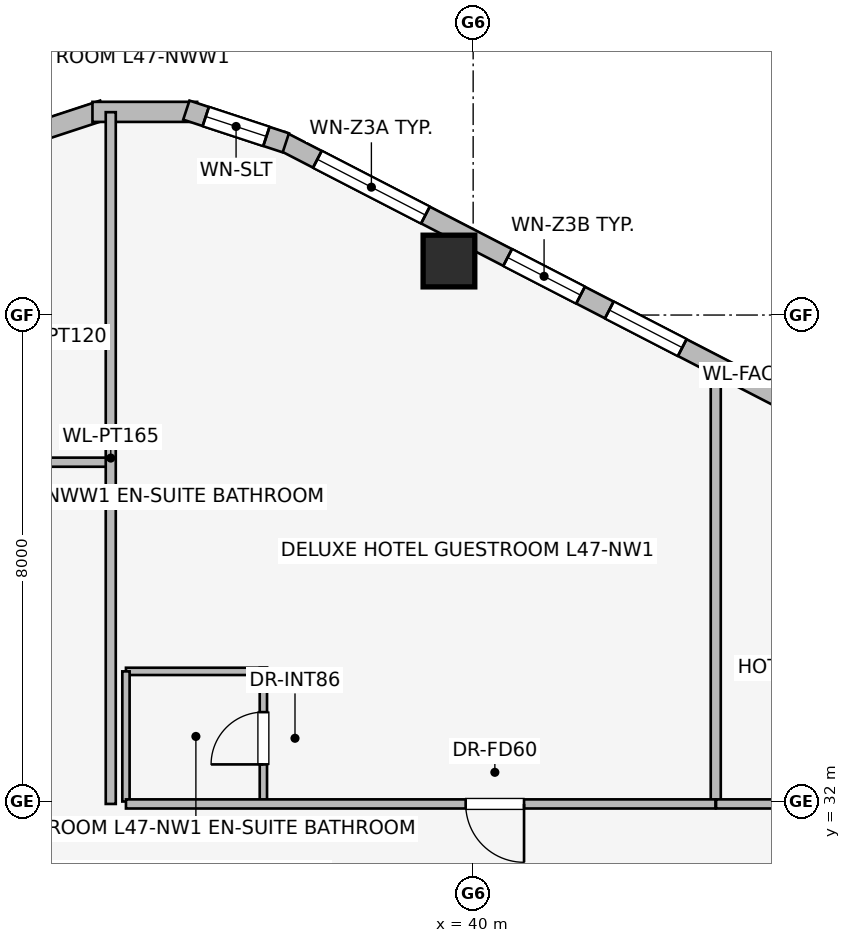
"""IFC4 building model, lengths in metres.
Left out: names, types, materials, properties, quantities, classifications, styles, units other than length and angle.
Written with IfcOpenShell. Run it as: python <this file> out.ifc"""

import sys

from ifc_helpers import new_model, si_unit, direction, frame, frame_2d, origin, origin_2d, place, context, subcontext, project, spatial, rectangle, extrude, element, fill, save


model = new_model("IFC4")
c1 = context("Model", 3, precision=1e-05, world=origin(), true_north=direction((0.0, 1.0)))
c2 = subcontext(c1, "Body", "Model", "MODEL_VIEW")
j1 = project(units=[si_unit("LENGTHUNIT", "METRE"), si_unit("PLANEANGLEUNIT", "RADIAN")], contexts=[c1])
p1 = place(None, origin())
s1 = spatial("IfcSite", under=j1, at=p1, CompositionType="ELEMENT")
p2 = place(p1, origin())
s2 = spatial("IfcBuilding", under=s1, at=p2, CompositionType="ELEMENT")
p3 = place(p2, frame((0.0, 0.0, 174.0)))
s3 = spatial("IfcBuildingStorey", under=s2, at=p3, CompositionType="ELEMENT", Elevation=174.0)
p4 = place(p3, frame((39.602, 40.888, 0.0), z_axis=(0.0, 0.0, 1.0), x_axis=(1.0, 0.0, 0.0)))
e1 = element("IfcColumn", 1, at=p4, inside=s3, PredefinedType="COLUMN", context=c2, shape_type="SweptSolid", body=[
    extrude(rectangle(XDim=0.85, YDim=0.85, at=origin_2d()), origin(), (0.0, 0.0, 1.0), 3.45),
])
p5 = place(p3, frame((36.838, 42.871, 0.0), z_axis=(0.0, 0.0, 1.0), x_axis=(0.888626188278, -0.458632202867, 0.0)))
e2 = element("IfcWall", 2, at=p5, inside=s3, PredefinedType="STANDARD", context=c2, shape_type="SweptSolid", body=[
    extrude(rectangle(XDim=16.828, YDim=0.31, at=frame_2d((8.414, 0.0))), origin(), (0.0, 0.0, 1.0), 3.16),
])
p6 = place(p5, frame((0.675, 0.0, 0.75)))
e3 = element("IfcOpeningElement", 3, at=p6, cuts=e2, PredefinedType="OPENING", context=c2, shape_type="SweptSolid", body=[
    extrude(rectangle(XDim=2.0, YDim=1.5, at=frame_2d((1.0, 0.75))), frame((0.0, 0.165, 0.0), z_axis=(0.0, -1.0, 0.0), x_axis=(1.0, 0.0, 0.0)), (0.0, 0.0, 1.0), 0.33),
])
p7 = place(p5, frame((4.196, 0.0, 0.75)))
e4 = element("IfcOpeningElement", 4, at=p7, cuts=e2, PredefinedType="OPENING", context=c2, shape_type="SweptSolid", body=[
    extrude(rectangle(XDim=1.35, YDim=1.45, at=frame_2d((0.675, 0.725))), frame((0.0, 0.165, 0.0), z_axis=(0.0, -1.0, 0.0), x_axis=(1.0, 0.0, 0.0)), (0.0, 0.0, 1.0), 0.33),
])
p8 = place(p5, frame((6.078, 0.0, 0.75)))
e5 = element("IfcOpeningElement", 5, at=p8, cuts=e2, PredefinedType="OPENING", context=c2, shape_type="SweptSolid", body=[
    extrude(rectangle(XDim=1.35, YDim=1.45, at=frame_2d((0.675, 0.725))), frame((0.0, 0.165, 0.0), z_axis=(0.0, -1.0, 0.0), x_axis=(1.0, 0.0, 0.0)), (0.0, 0.0, 1.0), 0.33),
])
p9 = place(p5, frame((9.658, 0.0, 0.75)))
e6 = element("IfcOpeningElement", 6, at=p9, cuts=e2, PredefinedType="OPENING", context=c2, shape_type="SweptSolid", body=[
    extrude(rectangle(XDim=2.0, YDim=1.5, at=frame_2d((1.0, 0.75))), frame((0.0, 0.165, 0.0), z_axis=(0.0, -1.0, 0.0), x_axis=(1.0, 0.0, 0.0)), (0.0, 0.0, 1.0), 0.33),
])
p10 = place(p5, frame((14.478, 0.0, 0.75)))
e7 = element("IfcOpeningElement", 7, at=p10, cuts=e2, PredefinedType="OPENING", context=c2, shape_type="SweptSolid", body=[
    extrude(rectangle(XDim=1.35, YDim=1.45, at=frame_2d((0.675, 0.725))), frame((0.0, 0.165, 0.0), z_axis=(0.0, -1.0, 0.0), x_axis=(1.0, 0.0, 0.0)), (0.0, 0.0, 1.0), 0.33),
])
p11 = place(p3, frame((32.281, 42.832, 0.0), z_axis=(0.0, 0.0, 1.0), x_axis=(0.949937416267, 0.312440242569, 0.0)))
e8 = element("IfcWall", 8, at=p11, inside=s3, PredefinedType="STANDARD", context=c2, shape_type="SweptSolid", body=[
    extrude(rectangle(XDim=1.722, YDim=0.33, at=frame_2d((0.861, 0.0))), origin(), (0.0, 0.0, 1.0), 3.16),
])
p12 = place(p3, frame((33.739, 43.341, 0.0), z_axis=(0.0, 0.0, 1.0), x_axis=(1.0, 0.0, 0.0)))
e9 = element("IfcWall", 9, at=p12, inside=s3, PredefinedType="STANDARD", context=c2, shape_type="SweptSolid", body=[
    extrude(rectangle(XDim=1.722, YDim=0.33, at=frame_2d((0.861, 0.0))), origin(), (0.0, 0.0, 1.0), 3.16),
])
p13 = place(p3, frame((35.283, 43.37, 0.0), z_axis=(0.0, 0.0, 1.0), x_axis=(0.949937416267, -0.312440242569, 0.0)))
e10 = element("IfcWall", 10, at=p13, inside=s3, PredefinedType="STANDARD", context=c2, shape_type="SweptSolid", body=[
    extrude(rectangle(XDim=1.722, YDim=0.33, at=frame_2d((0.861, 0.0))), origin(), (0.0, 0.0, 1.0), 3.16),
])
p14 = place(p13, frame((0.336, 0.0, 0.75)))
e11 = element("IfcOpeningElement", 11, at=p14, cuts=e10, PredefinedType="OPENING", context=c2, shape_type="SweptSolid", body=[
    extrude(rectangle(XDim=1.05, YDim=1.4, at=frame_2d((0.525, 0.7))), frame((0.0, 0.175, 0.0), z_axis=(0.0, -1.0, 0.0), x_axis=(1.0, 0.0, 0.0)), (0.0, 0.0, 1.0), 0.35),
])
p15 = place(p3, frame((34.0, 39.64, 0.0), z_axis=(0.0, 0.0, 1.0), x_axis=(-1.0, 0.0, 0.0)))
e12 = element("IfcWall", 12, at=p15, inside=s3, PredefinedType="PARTITIONING", context=c2, shape_type="SweptSolid", body=[
    extrude(rectangle(XDim=2.34, YDim=0.12, at=frame_2d((1.17, 0.0))), origin(), (0.0, 0.0, 1.0), 3.16),
])
p16 = place(p3, frame((34.0, 37.58, 0.0), z_axis=(0.0, 0.0, 1.0), x_axis=(-1.0, 0.0, 0.0)))
e13 = element("IfcWall", 13, at=p16, inside=s3, PredefinedType="PARTITIONING", context=c2, shape_type="SweptSolid", body=[
    extrude(rectangle(XDim=12.075, YDim=0.15, at=frame_2d((6.038, 0.0))), origin(), (0.0, 0.0, 1.0), 3.16),
])
p17 = place(p16, frame((4.96, 0.0, 0.0)))
e14 = element("IfcOpeningElement", 14, at=p17, cuts=e13, PredefinedType="OPENING", context=c2, shape_type="SweptSolid", body=[
    extrude(rectangle(XDim=0.96, YDim=2.0, at=frame_2d((0.48, 1.0))), frame((0.0, 0.085, 0.0), z_axis=(0.0, -1.0, 0.0), x_axis=(1.0, 0.0, 0.0)), (0.0, 0.0, 1.0), 0.17),
])
p18 = place(p3, frame((34.04, 31.96, 0.0), z_axis=(0.0, 0.0, 1.0), x_axis=(0.0, 1.0, 0.0)))
e15 = element("IfcWall", 15, at=p18, inside=s3, PredefinedType="PARTITIONING", context=c2, shape_type="SweptSolid", body=[
    extrude(rectangle(XDim=11.376, YDim=0.165, at=frame_2d((5.688, 0.0))), origin(), (0.0, 0.0, 1.0), 3.16),
])
p19 = place(p3, frame((43.99, 31.97, 0.0), z_axis=(0.0, 0.0, 1.0), x_axis=(0.0, 1.0, 0.0)))
e16 = element("IfcWall", 16, at=p19, inside=s3, PredefinedType="PARTITIONING", context=c2, shape_type="SweptSolid", body=[
    extrude(rectangle(XDim=7.193, YDim=0.165, at=frame_2d((3.597, 0.0))), origin(), (0.0, 0.0, 1.0), 3.16),
])
p20 = place(p3, frame((36.55, 31.96, 0.0), z_axis=(0.0, 0.0, 1.0), x_axis=(0.0, 1.0, 0.0)))
e17 = element("IfcWall", 17, at=p20, inside=s3, PredefinedType="PARTITIONING", context=c2, shape_type="SweptSolid", body=[
    extrude(rectangle(XDim=2.24, YDim=0.12, at=frame_2d((1.12, 0.0))), origin(), (0.0, 0.0, 1.0), 3.16),
])
p21 = place(p20, frame((0.65, 0.0, 0.0)))
e18 = element("IfcOpeningElement", 18, at=p21, cuts=e17, PredefinedType="OPENING", context=c2, shape_type="SweptSolid", body=[
    extrude(rectangle(XDim=0.86, YDim=2.0, at=frame_2d((0.43, 1.0))), frame((0.0, 0.07, 0.0), z_axis=(0.0, -1.0, 0.0), x_axis=(1.0, 0.0, 0.0)), (0.0, 0.0, 1.0), 0.14),
])
p22 = place(p3, frame((36.61, 34.14, 0.0), z_axis=(0.0, 0.0, 1.0), x_axis=(-1.0, 0.0, 0.0)))
e19 = element("IfcWall", 19, at=p22, inside=s3, PredefinedType="PARTITIONING", context=c2, shape_type="SweptSolid", body=[
    extrude(rectangle(XDim=2.32, YDim=0.12, at=frame_2d((1.16, 0.0))), origin(), (0.0, 0.0, 1.0), 3.16),
])
p23 = place(p3, frame((34.29, 34.14, 0.0), z_axis=(0.0, 0.0, 1.0), x_axis=(0.0, -1.0, 0.0)))
e20 = element("IfcWall", 20, at=p23, inside=s3, PredefinedType="PARTITIONING", context=c2, shape_type="SweptSolid", body=[
    extrude(rectangle(XDim=2.14, YDim=0.12, at=frame_2d((1.07, 0.0))), origin(), (0.0, 0.0, 1.0), 3.16),
])
p24 = place(p3, frame((43.985, 31.96, 0.0), z_axis=(0.0, 0.0, 1.0), x_axis=(-1.0, 0.0, 0.0)))
e21 = element("IfcWall", 21, at=p24, inside=s3, PredefinedType="PARTITIONING", context=c2, shape_type="SweptSolid", body=[
    extrude(rectangle(XDim=9.695, YDim=0.15, at=frame_2d((4.848, 0.0))), origin(), (0.0, 0.0, 1.0), 3.16),
])
p25 = place(p24, frame((3.148, 0.0, 0.0)))
e22 = element("IfcOpeningElement", 22, at=p25, cuts=e21, PredefinedType="OPENING", context=c2, shape_type="SweptSolid", body=[
    extrude(rectangle(XDim=0.96, YDim=2.0, at=frame_2d((0.48, 1.0))), frame((0.0, 0.085, 0.0), z_axis=(0.0, -1.0, 0.0), x_axis=(1.0, 0.0, 0.0)), (0.0, 0.0, 1.0), 0.17),
])
p26 = place(p3, frame((53.97, 31.96, 0.0), z_axis=(0.0, 0.0, 1.0), x_axis=(-1.0, 0.0, 0.0)))
e23 = element("IfcWall", 23, at=p26, inside=s3, PredefinedType="PARTITIONING", context=c2, shape_type="SweptSolid", body=[
    extrude(rectangle(XDim=9.975, YDim=0.15, at=frame_2d((4.987, 0.0))), origin(), (0.0, 0.0, 1.0), 3.16),
])
p27 = place(p26, frame((4.627, 0.0, 0.0)))
e24 = element("IfcOpeningElement", 24, at=p27, cuts=e23, PredefinedType="OPENING", context=c2, shape_type="SweptSolid", body=[
    extrude(rectangle(XDim=0.96, YDim=2.0, at=frame_2d((0.48, 1.0))), frame((0.0, 0.085, 0.0), z_axis=(0.0, -1.0, 0.0), x_axis=(1.0, 0.0, 0.0)), (0.0, 0.0, 1.0), 0.17),
])
p28 = place(p6, origin())
e25 = element("IfcWindow", 25, at=p28, inside=s3, PartitioningType="SINGLE_PANEL", PredefinedType="WINDOW", context=c2, shape_type="SweptSolid", body=[
    extrude(rectangle(XDim=2.0, YDim=1.5, at=frame_2d((1.0, 0.75))), frame((0.0, 0.03, 0.0), z_axis=(0.0, -1.0, 0.0), x_axis=(1.0, 0.0, 0.0)), (0.0, 0.0, 1.0), 0.06),
])
fill(e3, e25)
p29 = place(p7, origin())
e26 = element("IfcWindow", 26, at=p29, inside=s3, PartitioningType="SINGLE_PANEL", PredefinedType="WINDOW", context=c2, shape_type="SweptSolid", body=[
    extrude(rectangle(XDim=1.35, YDim=1.45, at=frame_2d((0.675, 0.725))), frame((0.0, 0.03, 0.0), z_axis=(0.0, -1.0, 0.0), x_axis=(1.0, 0.0, 0.0)), (0.0, 0.0, 1.0), 0.06),
])
fill(e4, e26)
p30 = place(p8, origin())
e27 = element("IfcWindow", 27, at=p30, inside=s3, PartitioningType="SINGLE_PANEL", PredefinedType="WINDOW", context=c2, shape_type="SweptSolid", body=[
    extrude(rectangle(XDim=1.35, YDim=1.45, at=frame_2d((0.675, 0.725))), frame((0.0, 0.03, 0.0), z_axis=(0.0, -1.0, 0.0), x_axis=(1.0, 0.0, 0.0)), (0.0, 0.0, 1.0), 0.06),
])
fill(e5, e27)
p31 = place(p14, origin())
e28 = element("IfcWindow", 28, at=p31, inside=s3, PartitioningType="SINGLE_PANEL", PredefinedType="WINDOW", context=c2, shape_type="SweptSolid", body=[
    extrude(rectangle(XDim=1.05, YDim=1.4, at=frame_2d((0.525, 0.7))), frame((0.0, 0.03, 0.0), z_axis=(0.0, -1.0, 0.0), x_axis=(1.0, 0.0, 0.0)), (0.0, 0.0, 1.0), 0.06),
])
fill(e11, e28)
p32 = place(p21, origin())
e29 = element("IfcDoor", 29, at=p32, inside=s3, OperationType="SINGLE_SWING_LEFT", PredefinedType="DOOR", context=c2, shape_type="SweptSolid", body=[
    extrude(rectangle(XDim=0.86, YDim=2.0, at=frame_2d((0.43, 1.0))), frame((0.0, 0.025, 0.0), z_axis=(0.0, -1.0, 0.0), x_axis=(1.0, 0.0, 0.0)), (0.0, 0.0, 1.0), 0.05),
])
fill(e18, e29)
p33 = place(p25, origin())
e30 = element("IfcDoor", 30, at=p33, inside=s3, OperationType="SINGLE_SWING_LEFT", PredefinedType="DOOR", context=c2, shape_type="SweptSolid", body=[
    extrude(rectangle(XDim=0.96, YDim=2.0, at=frame_2d((0.48, 1.0))), frame((0.0, 0.025, 0.0), z_axis=(0.0, -1.0, 0.0), x_axis=(1.0, 0.0, 0.0)), (0.0, 0.0, 1.0), 0.05),
])
fill(e22, e30)
save(model, sys.argv[1])
